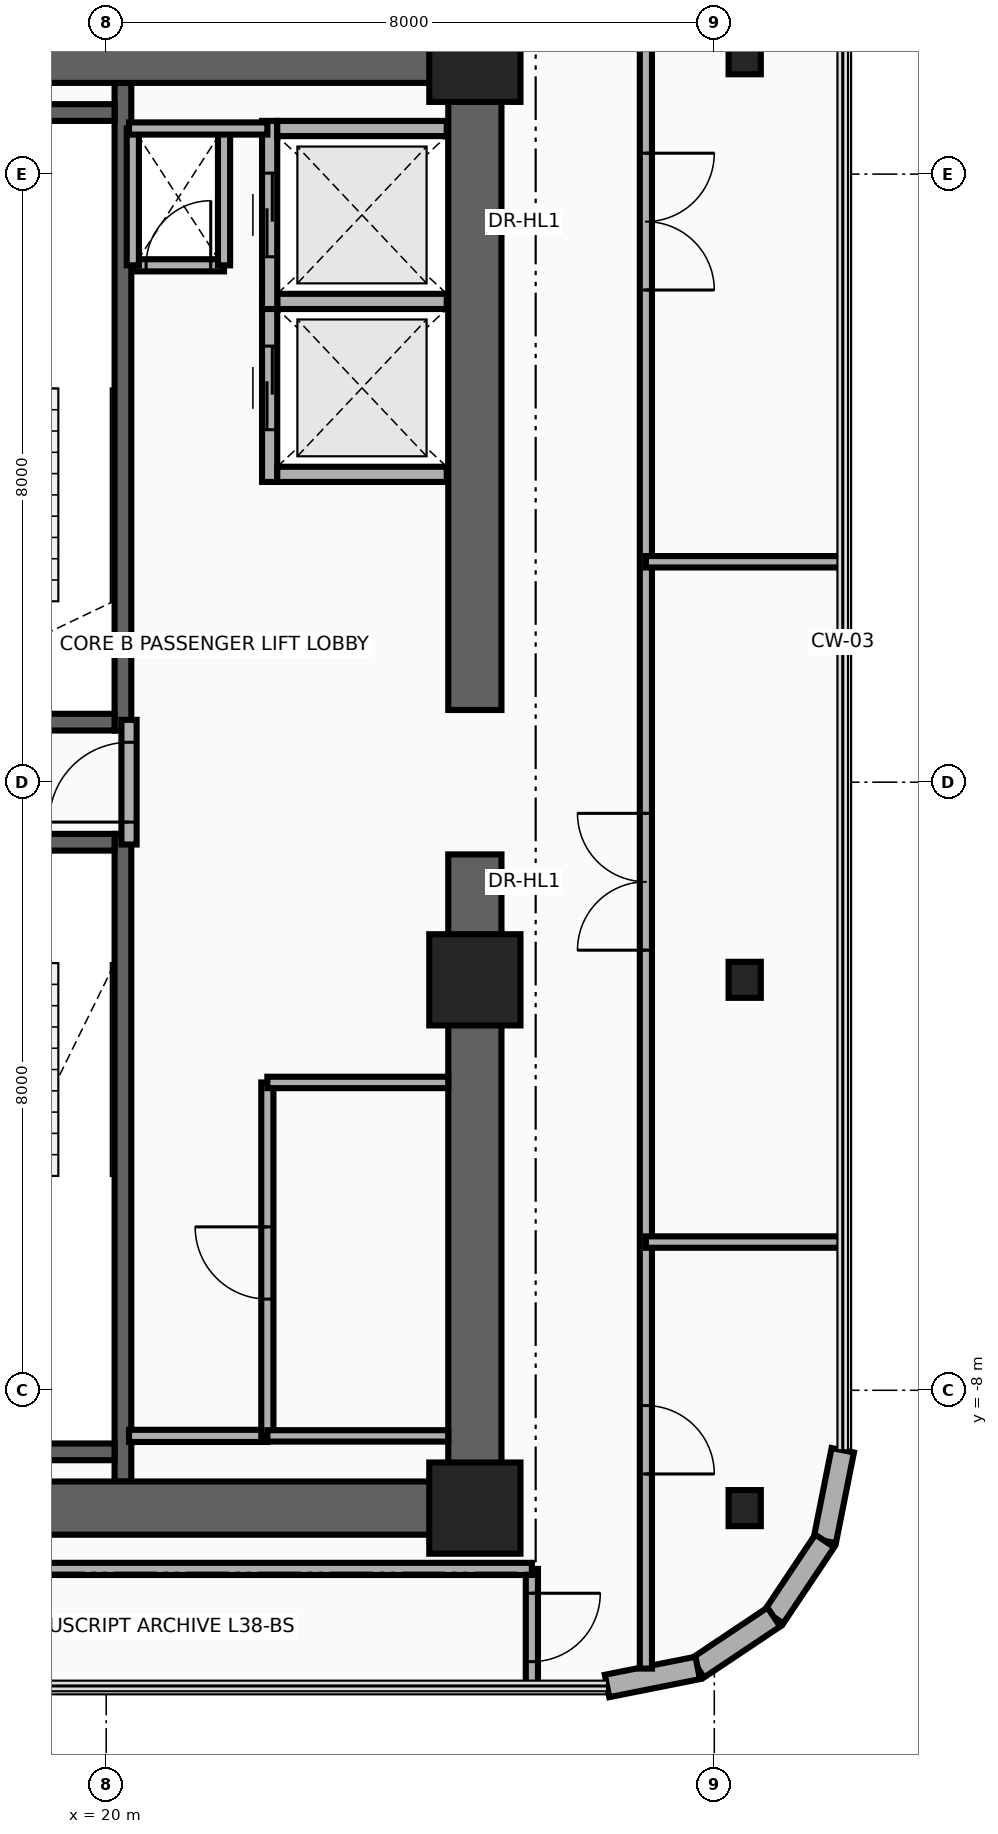
"""IFC4 building model, lengths in metres.
Left out: names, types, materials, properties, quantities, classifications, styles, units other than length and angle.
Written with IfcOpenShell. Run it as: python <this file> out.ifc"""

import sys

from ifc_helpers import new_model, si_unit, direction, frame, frame_2d, origin, origin_2d, place, context, subcontext, project, spatial, rectangle, i_section, extrude, source, transform, mapped, element, fill, save


model = new_model("IFC4")
c1 = context("Model", 3, precision=1e-05, world=origin(), true_north=direction((0.0, 1.0)))
c2 = subcontext(c1, "Body", "Model", "MODEL_VIEW")
j1 = project(units=[si_unit("LENGTHUNIT", "METRE"), si_unit("PLANEANGLEUNIT", "RADIAN")], contexts=[c1])
p1 = place(None, origin())
s1 = spatial("IfcSite", under=j1, at=p1, CompositionType="ELEMENT")
p2 = place(p1, origin())
s2 = spatial("IfcBuilding", under=s1, at=p2, CompositionType="ELEMENT")
p3 = place(p2, frame((0.0, 0.0, 150.1)))
s3 = spatial("IfcBuildingStorey", under=s2, at=p3, CompositionType="ELEMENT", Elevation=150.1)
p4 = place(p3, frame((20.22, 0.68, 0.0), z_axis=(0.0, 0.0, 1.0), x_axis=(0.0, 1.0, 0.0)))
e1 = element("IfcWall", 1, at=p4, inside=s3, PredefinedType="SHEAR", context=c2, shape_type="SweptSolid", body=[
    extrude(rectangle(XDim=8.52, YDim=0.22, at=frame_2d((4.26, 0.0))), origin(), (0.0, 0.0, 1.0), 3.46),
])
p5 = place(p3, frame((17.0, 0.79, 0.0), z_axis=(0.0, 0.0, 1.0), x_axis=(1.0, 0.0, 0.0)))
e2 = element("IfcWall", 2, at=p5, inside=s3, PredefinedType="SHEAR", context=c2, shape_type="SweptSolid", body=[
    extrude(rectangle(XDim=3.11, YDim=0.22, at=frame_2d((1.555, 0.0))), origin(), (0.0, 0.0, 1.0), 3.46),
])
p6 = place(p5, frame((0.95, 0.0, 0.0)))
e3 = element("IfcOpeningElement", 3, at=p6, cuts=e2, PredefinedType="OPENING", context=c2, shape_type="SweptSolid", body=[
    extrude(rectangle(XDim=1.1, YDim=2.15, at=frame_2d((0.55, 1.075))), frame((0.0, 0.125, 0.0), z_axis=(0.0, -1.0, 0.0), x_axis=(1.0, 0.0, 0.0)), (0.0, 0.0, 1.0), 0.25),
])
p7 = place(p3, frame((17.0, 8.81, 0.0), z_axis=(0.0, 0.0, 1.0), x_axis=(1.0, 0.0, 0.0)))
e4 = element("IfcWall", 4, at=p7, inside=s3, PredefinedType="SHEAR", context=c2, shape_type="SweptSolid", body=[
    extrude(rectangle(XDim=3.11, YDim=0.22, at=frame_2d((1.555, 0.0))), origin(), (0.0, 0.0, 1.0), 3.46),
])
p8 = place(p3, frame((20.22, -9.2, 0.0), z_axis=(0.0, 0.0, 1.0), x_axis=(0.0, 1.0, 0.0)))
e5 = element("IfcWall", 5, at=p8, inside=s3, PredefinedType="SHEAR", context=c2, shape_type="SweptSolid", body=[
    extrude(rectangle(XDim=8.52, YDim=0.22, at=frame_2d((4.26, 0.0))), origin(), (0.0, 0.0, 1.0), 3.46),
])
p9 = place(p3, frame((17.0, -8.81, 0.0), z_axis=(0.0, 0.0, 1.0), x_axis=(1.0, 0.0, 0.0)))
e6 = element("IfcWall", 6, at=p9, inside=s3, PredefinedType="SHEAR", context=c2, shape_type="SweptSolid", body=[
    extrude(rectangle(XDim=3.11, YDim=0.22, at=frame_2d((1.555, 0.0))), origin(), (0.0, 0.0, 1.0), 3.46),
])
p10 = place(p3, frame((17.0, -0.79, 0.0), z_axis=(0.0, 0.0, 1.0), x_axis=(1.0, 0.0, 0.0)))
e7 = element("IfcWall", 7, at=p10, inside=s3, PredefinedType="SHEAR", context=c2, shape_type="SweptSolid", body=[
    extrude(rectangle(XDim=3.11, YDim=0.22, at=frame_2d((1.555, 0.0))), origin(), (0.0, 0.0, 1.0), 3.46),
])
p11 = place(p10, frame((0.95, 0.0, 0.0)))
e8 = element("IfcOpeningElement", 8, at=p11, cuts=e7, PredefinedType="OPENING", context=c2, shape_type="SweptSolid", body=[
    extrude(rectangle(XDim=1.1, YDim=2.15, at=frame_2d((0.55, 1.075))), frame((0.0, 0.125, 0.0), z_axis=(0.0, -1.0, 0.0), x_axis=(1.0, 0.0, 0.0)), (0.0, 0.0, 1.0), 0.25),
])
for number, where, z_axis, x_axis in (
    (9, (24.85, -9.9, 0.0), (0.0, 0.0, 1.0), (0.0, 1.0, 0.0)),
    (10, (24.85, 0.95, 0.0), (0.0, 0.0, 1.0), (0.0, 1.0, 0.0)),
):
    element("IfcWall", number, at=place(p3, frame(where, z_axis=z_axis, x_axis=x_axis)), inside=s3, PredefinedType="SHEAR", context=c2, shape_type="SweptSolid", body=[
        extrude(rectangle(XDim=8.95, YDim=0.7, at=frame_2d((4.475, 0.0))), origin(), (0.0, 0.0, 1.0), 3.46),
    ])
for number, where, z_axis, x_axis in (
    (11, (15.85, 9.55, 0.0), (0.0, 0.0, 1.0), (1.0, 0.0, 0.0)),
    (12, (15.85, -9.55, 0.0), (0.0, 0.0, 1.0), (1.0, 0.0, 0.0)),
):
    element("IfcWall", number, at=place(p3, frame(where, z_axis=z_axis, x_axis=x_axis)), inside=s3, PredefinedType="SHEAR", context=c2, shape_type="SweptSolid", body=[
        extrude(rectangle(XDim=9.0, YDim=0.7, at=frame_2d((4.5, 0.0))), origin(), (0.0, 0.0, 1.0), 3.46),
    ])
m1 = source(origin(), c2, "Body", "SweptSolid", [
    extrude(rectangle(XDim=1.2, YDim=1.2, at=origin_2d()), origin(), (0.0, 0.0, 1.0), 3.7),
])
p12 = place(p3, frame((24.85, -9.55, 0.0), z_axis=(0.0, 0.0, 1.0), x_axis=(1.0, 0.0, 0.0)))
e13 = element("IfcColumn", 13, at=p12, inside=s3, PredefinedType="COLUMN", context=c2, shape_type="MappedRepresentation", body=[
    mapped(m1, transform((0.0, 0.0, 0.0), x_axis=(1.0, 0.0, 0.0), y_axis=(0.0, 1.0, 0.0), z_axis=(0.0, 0.0, 1.0), scale=1.0)),
])
m2 = source(origin(), c2, "Body", "SweptSolid", [
    extrude(i_section(OverallWidth=0.424, OverallDepth=0.474, WebThickness=0.048, FlangeThickness=0.077, at=origin_2d()), origin(), (0.0, 0.0, 1.0), 3.7),
])
p13 = place(p3, frame((28.4, -9.55, 0.0), z_axis=(0.0, 0.0, 1.0), x_axis=(1.0, 0.0, 0.0)))
e14 = element("IfcColumn", 14, at=p13, inside=s3, PredefinedType="COLUMN", context=c2, shape_type="MappedRepresentation", body=[
    mapped(m2, transform((0.0, 0.0, 0.0), x_axis=(1.0, 0.0, 0.0), y_axis=(0.0, 1.0, 0.0), z_axis=(0.0, 0.0, 1.0), scale=1.0)),
])
p14 = place(p3, frame((24.85, -2.6, 0.0), z_axis=(0.0, 0.0, 1.0), x_axis=(1.0, 0.0, 0.0)))
e15 = element("IfcColumn", 15, at=p14, inside=s3, PredefinedType="COLUMN", context=c2, shape_type="MappedRepresentation", body=[
    mapped(m1, transform((0.0, 0.0, 0.0), x_axis=(1.0, 0.0, 0.0), y_axis=(0.0, 1.0, 0.0), z_axis=(0.0, 0.0, 1.0), scale=1.0)),
])
p15 = place(p3, frame((28.4, -2.6, 0.0), z_axis=(0.0, 0.0, 1.0), x_axis=(1.0, 0.0, 0.0)))
e16 = element("IfcColumn", 16, at=p15, inside=s3, PredefinedType="COLUMN", context=c2, shape_type="MappedRepresentation", body=[
    mapped(m2, transform((0.0, 0.0, 0.0), x_axis=(1.0, 0.0, 0.0), y_axis=(0.0, 1.0, 0.0), z_axis=(0.0, 0.0, 1.0), scale=1.0)),
])
p16 = place(p3, frame((24.85, 9.55, 0.0), z_axis=(0.0, 0.0, 1.0), x_axis=(1.0, 0.0, 0.0)))
e17 = element("IfcColumn", 17, at=p16, inside=s3, PredefinedType="COLUMN", context=c2, shape_type="MappedRepresentation", body=[
    mapped(m1, transform((0.0, 0.0, 0.0), x_axis=(1.0, 0.0, 0.0), y_axis=(0.0, 1.0, 0.0), z_axis=(0.0, 0.0, 1.0), scale=1.0)),
])
p17 = place(p3, frame((28.4, 9.55, 0.0), z_axis=(0.0, 0.0, 1.0), x_axis=(1.0, 0.0, 0.0)))
e18 = element("IfcColumn", 18, at=p17, inside=s3, PredefinedType="COLUMN", context=c2, shape_type="MappedRepresentation", body=[
    mapped(m2, transform((0.0, 0.0, 0.0), x_axis=(1.0, 0.0, 0.0), y_axis=(0.0, 1.0, 0.0), z_axis=(0.0, 0.0, 1.0), scale=1.0)),
])
p18 = place(p3, frame((29.69, -8.789, 0.0), z_axis=(0.0, 0.0, 1.0), x_axis=(-0.194996050505, -0.980804027463, 0.0)))
e19 = element("IfcWall", 19, at=p18, inside=s3, PredefinedType="SOLIDWALL", context=c2, shape_type="SweptSolid", body=[
    extrude(rectangle(XDim=1.216, YDim=0.3, at=frame_2d((0.608, 0.0))), origin(), (0.0, 0.0, 1.0), 3.46),
])
for number, where, z_axis, x_axis in (
    (20, (29.453, -9.982, 0.0), (0.0, 0.0, 1.0), (-0.556, -0.831, 0.0)),
    (21, (28.783, -10.983, 0.0), (0.0, 0.0, 1.0), (-0.831, -0.556, 0.0)),
):
    element("IfcWall", number, at=place(p3, frame(where, z_axis=z_axis, x_axis=x_axis)), inside=s3, PredefinedType="SOLIDWALL", context=c2, shape_type="SweptSolid", body=[
        extrude(rectangle(XDim=1.205, YDim=0.3, at=frame_2d((0.603, 0.0))), origin(), (0.0, 0.0, 1.0), 3.46),
    ])
p19 = place(p3, frame((27.782, -11.653, 0.0), z_axis=(0.0, 0.0, 1.0), x_axis=(-0.980811661072, -0.194957650543, 0.0)))
e22 = element("IfcWall", 22, at=p19, inside=s3, PredefinedType="SOLIDWALL", context=c2, shape_type="SweptSolid", body=[
    extrude(rectangle(XDim=1.216, YDim=0.3, at=frame_2d((0.608, 0.0))), origin(), (0.0, 0.0, 1.0), 3.46),
])
p20 = place(p3, frame((22.15, 3.95, 0.0), z_axis=(0.0, 0.0, 1.0), x_axis=(0.0, 1.0, 0.0)))
e23 = element("IfcWall", 23, at=p20, inside=s3, PredefinedType="MOVABLE", context=c2, shape_type="SweptSolid", body=[
    extrude(rectangle(XDim=2.475, YDim=0.2, at=frame_2d((1.238, 0.0))), origin(), (0.0, 0.0, 1.0), 3.46),
])
p21 = place(p20, frame((0.688, 0.0, 0.0)))
e24 = element("IfcOpeningElement", 24, at=p21, cuts=e23, PredefinedType="OPENING", context=c2, shape_type="SweptSolid", body=[
    extrude(rectangle(XDim=1.1, YDim=2.1, at=frame_2d((0.55, 1.05))), frame((0.0, 0.115, 0.0), z_axis=(0.0, -1.0, 0.0), x_axis=(1.0, 0.0, 0.0)), (0.0, 0.0, 1.0), 0.23),
])
for number, where, z_axis, x_axis in (
    (25, (22.25, 4.05, 0.0), (0.0, 0.0, 1.0), (1.0, 0.0, 0.0)),
    (26, (22.25, 6.325, 0.0), (0.0, 0.0, 1.0), (1.0, 0.0, 0.0)),
):
    element("IfcWall", number, at=place(p3, frame(where, z_axis=z_axis, x_axis=x_axis)), inside=s3, PredefinedType="MOVABLE", context=c2, shape_type="SweptSolid", body=[
        extrude(rectangle(XDim=2.23, YDim=0.2, at=frame_2d((1.115, 0.0))), origin(), (0.0, 0.0, 1.0), 2.245),
    ])
p22 = place(p3, frame((22.15, 6.225, 0.0), z_axis=(0.0, 0.0, 1.0), x_axis=(0.0, 1.0, 0.0)))
e27 = element("IfcWall", 27, at=p22, inside=s3, PredefinedType="MOVABLE", context=c2, shape_type="SweptSolid", body=[
    extrude(rectangle(XDim=2.475, YDim=0.2, at=frame_2d((1.237, 0.0))), origin(), (0.0, 0.0, 1.0), 3.46),
])
p23 = place(p22, frame((0.688, 0.0, 0.0)))
e28 = element("IfcOpeningElement", 28, at=p23, cuts=e27, PredefinedType="OPENING", context=c2, shape_type="SweptSolid", body=[
    extrude(rectangle(XDim=1.1, YDim=2.1, at=frame_2d((0.55, 1.05))), frame((0.0, 0.115, 0.0), z_axis=(0.0, -1.0, 0.0), x_axis=(1.0, 0.0, 0.0)), (0.0, 0.0, 1.0), 0.23),
])
p24 = place(p3, frame((22.25, 8.6, 0.0), z_axis=(0.0, 0.0, 1.0), x_axis=(1.0, 0.0, 0.0)))
e29 = element("IfcWall", 29, at=p24, inside=s3, PredefinedType="MOVABLE", context=c2, shape_type="SweptSolid", body=[
    extrude(rectangle(XDim=2.23, YDim=0.2, at=frame_2d((1.115, 0.0))), origin(), (0.0, 0.0, 1.0), 2.245),
])
p25 = place(p3, frame((20.3, -0.82, 0.0), z_axis=(0.0, 0.0, 1.0), x_axis=(0.0, 1.0, 0.0)))
e30 = element("IfcWall", 30, at=p25, inside=s3, PredefinedType="PARTITIONING", context=c2, shape_type="SweptSolid", body=[
    extrude(rectangle(XDim=1.64, YDim=0.2, at=frame_2d((0.82, 0.0))), origin(), (0.0, 0.0, 1.0), 3.46),
])
p26 = place(p25, frame((0.295, 0.0, 0.0)))
e31 = element("IfcOpeningElement", 31, at=p26, cuts=e30, PredefinedType="OPENING", context=c2, shape_type="SweptSolid", body=[
    extrude(rectangle(XDim=1.05, YDim=2.15, at=frame_2d((0.525, 1.075))), frame((0.0, 0.115, 0.0), z_axis=(0.0, -1.0, 0.0), x_axis=(1.0, 0.0, 0.0)), (0.0, 0.0, 1.0), 0.23),
])
p27 = place(p3, frame((20.35, 6.8, 0.0), z_axis=(0.0, 0.0, 1.0), x_axis=(1.0, 0.0, 0.0)))
e32 = element("IfcWall", 32, at=p27, inside=s3, PredefinedType="PARTITIONING", context=c2, shape_type="SweptSolid", body=[
    extrude(rectangle(XDim=1.2, YDim=0.16, at=frame_2d((0.6, 0.0))), origin(), (0.0, 0.0, 1.0), 3.46),
])
p28 = place(p27, frame((0.175, 0.0, 0.0)))
e33 = element("IfcOpeningElement", 33, at=p28, cuts=e32, PredefinedType="OPENING", context=c2, shape_type="SweptSolid", body=[
    extrude(rectangle(XDim=0.85, YDim=2.05, at=frame_2d((0.425, 1.025))), frame((0.0, 0.095, 0.0), z_axis=(0.0, -1.0, 0.0), x_axis=(1.0, 0.0, 0.0)), (0.0, 0.0, 1.0), 0.19),
])
for number, where, z_axis, x_axis in (
    (34, (21.55, 6.8, 0.0), (0.0, 0.0, 1.0), (0.0, 1.0, 0.0)),
    (35, (20.35, 6.8, 0.0), (0.0, 0.0, 1.0), (0.0, 1.0, 0.0)),
):
    element("IfcWall", number, at=place(p3, frame(where, z_axis=z_axis, x_axis=x_axis)), inside=s3, PredefinedType="PARTITIONING", context=c2, shape_type="SweptSolid", body=[
        extrude(rectangle(XDim=1.8, YDim=0.16, at=frame_2d((0.9, 0.0))), origin(), (0.0, 0.0, 1.0), 3.46),
    ])
for number, where, z_axis, x_axis in (
    (36, (20.3, -8.6, 0.0), (0.0, 0.0, 1.0), (1.0, 0.0, 0.0)),
    (37, (20.3, 8.6, 0.0), (0.0, 0.0, 1.0), (1.0, 0.0, 0.0)),
):
    element("IfcWall", number, at=place(p3, frame(where, z_axis=z_axis, x_axis=x_axis)), inside=s3, PredefinedType="PARTITIONING", context=c2, shape_type="SweptSolid", body=[
        extrude(rectangle(XDim=1.82, YDim=0.16, at=frame_2d((0.91, 0.0))), origin(), (0.0, 0.0, 1.0), 3.46),
    ])
p29 = place(p3, frame((22.12, -8.6, 0.0), z_axis=(0.0, 0.0, 1.0), x_axis=(0.0, 1.0, 0.0)))
e38 = element("IfcWall", 38, at=p29, inside=s3, PredefinedType="PARTITIONING", context=c2, shape_type="SweptSolid", body=[
    extrude(rectangle(XDim=4.65, YDim=0.16, at=frame_2d((2.325, 0.0))), origin(), (0.0, 0.0, 1.0), 3.46),
])
p30 = place(p29, frame((1.8, 0.0, 0.0)))
e39 = element("IfcOpeningElement", 39, at=p30, cuts=e38, PredefinedType="OPENING", context=c2, shape_type="SweptSolid", body=[
    extrude(rectangle(XDim=0.95, YDim=2.15, at=frame_2d((0.475, 1.075))), frame((0.0, 0.095, 0.0), z_axis=(0.0, -1.0, 0.0), x_axis=(1.0, 0.0, 0.0)), (0.0, 0.0, 1.0), 0.19),
])
for number, where, z_axis, x_axis in (
    (40, (22.12, -3.95, 0.0), (0.0, 0.0, 1.0), (1.0, 0.0, 0.0)),
    (41, (22.12, -8.6, 0.0), (0.0, 0.0, 1.0), (1.0, 0.0, 0.0)),
):
    element("IfcWall", number, at=place(p3, frame(where, z_axis=z_axis, x_axis=x_axis)), inside=s3, PredefinedType="PARTITIONING", context=c2, shape_type="SweptSolid", body=[
        extrude(rectangle(XDim=2.38, YDim=0.15, at=frame_2d((1.19, 0.0))), origin(), (0.0, 0.0, 1.0), 3.46),
    ])
p31 = place(p3, frame((25.6, -11.89, 0.0), z_axis=(0.0, 0.0, 1.0), x_axis=(0.0, 1.0, 0.0)))
e42 = element("IfcWall", 42, at=p31, inside=s3, PredefinedType="PARTITIONING", context=c2, shape_type="SweptSolid", body=[
    extrude(rectangle(XDim=1.54, YDim=0.16, at=frame_2d((0.77, 0.0))), origin(), (0.0, 0.0, 1.0), 3.46),
])
p32 = place(p31, frame((0.32, 0.0, 0.0)))
e43 = element("IfcOpeningElement", 43, at=p32, cuts=e42, PredefinedType="OPENING", context=c2, shape_type="SweptSolid", body=[
    extrude(rectangle(XDim=0.9, YDim=2.1, at=frame_2d((0.45, 1.05))), frame((0.0, 0.095, 0.0), z_axis=(0.0, -1.0, 0.0), x_axis=(1.0, 0.0, 0.0)), (0.0, 0.0, 1.0), 0.19),
])
p33 = place(p3, frame((14.044, -10.35, 0.0), z_axis=(0.0, 0.0, 1.0), x_axis=(1.0, 0.0, 0.0)))
e44 = element("IfcWall", 44, at=p33, inside=s3, PredefinedType="PARTITIONING", context=c2, shape_type="SweptSolid", body=[
    extrude(rectangle(XDim=11.556, YDim=0.16, at=frame_2d((5.778, 0.0))), origin(), (0.0, 0.0, 1.0), 3.46),
])
p34 = place(p3, frame((27.1, -11.661, 0.0), z_axis=(0.0, 0.0, 1.0), x_axis=(0.0, 1.0, 0.0)))
e45 = element("IfcWall", 45, at=p34, inside=s3, PredefinedType="PARTITIONING", context=c2, shape_type="SweptSolid", body=[
    extrude(rectangle(XDim=23.511, YDim=0.16, at=frame_2d((11.755, 0.0))), origin(), (0.0, 0.0, 1.0), 2.666),
])
p35 = place(p34, frame((2.56, 0.0, 0.0)))
e46 = element("IfcOpeningElement", 46, at=p35, cuts=e45, PredefinedType="OPENING", context=c2, shape_type="SweptSolid", body=[
    extrude(rectangle(XDim=0.9, YDim=2.1, at=frame_2d((0.45, 1.05))), frame((0.0, 0.095, 0.0), z_axis=(0.0, -1.0, 0.0), x_axis=(1.0, 0.0, 0.0)), (0.0, 0.0, 1.0), 0.19),
])
p36 = place(p34, frame((9.451, 0.0, 0.0)))
e47 = element("IfcOpeningElement", 47, at=p36, cuts=e45, PredefinedType="OPENING", context=c2, shape_type="SweptSolid", body=[
    extrude(rectangle(XDim=1.8, YDim=2.15, at=frame_2d((0.9, 1.075))), frame((0.0, 0.095, 0.0), z_axis=(0.0, -1.0, 0.0), x_axis=(1.0, 0.0, 0.0)), (0.0, 0.0, 1.0), 0.19),
])
p37 = place(p34, frame((18.136, 0.0, 0.0)))
e48 = element("IfcOpeningElement", 48, at=p37, cuts=e45, PredefinedType="OPENING", context=c2, shape_type="SweptSolid", body=[
    extrude(rectangle(XDim=1.8, YDim=2.15, at=frame_2d((0.9, 1.075))), frame((0.0, 0.095, 0.0), z_axis=(0.0, -1.0, 0.0), x_axis=(1.0, 0.0, 0.0)), (0.0, 0.0, 1.0), 0.19),
])
for number, where, z_axis, x_axis in (
    (49, (27.1, -6.05, 0.0), (0.0, 0.0, 1.0), (1.0, 0.0, 0.0)),
    (50, (27.1, 2.9, 0.0), (0.0, 0.0, 1.0), (1.0, 0.0, 0.0)),
):
    element("IfcWall", number, at=place(p3, frame(where, z_axis=z_axis, x_axis=x_axis)), inside=s3, PredefinedType="PARTITIONING", context=c2, shape_type="SweptSolid", body=[
        extrude(rectangle(XDim=2.59, YDim=0.15, at=frame_2d((1.295, 0.0))), origin(), (0.0, 0.0, 1.0), 2.896),
    ])
p38 = place(p21, origin())
e51 = element("IfcDoor", 51, at=p38, inside=s3, OperationType="DOUBLE_DOOR_SLIDING", PredefinedType="DOOR", context=c2, shape_type="SweptSolid", body=[
    extrude(rectangle(XDim=1.1, YDim=2.1, at=frame_2d((0.55, 1.05))), frame((0.0, 0.025, 0.0), z_axis=(0.0, -1.0, 0.0), x_axis=(1.0, 0.0, 0.0)), (0.0, 0.0, 1.0), 0.05),
])
fill(e24, e51)
p39 = place(p23, origin())
e52 = element("IfcDoor", 52, at=p39, inside=s3, OperationType="DOUBLE_DOOR_SLIDING", PredefinedType="DOOR", context=c2, shape_type="SweptSolid", body=[
    extrude(rectangle(XDim=1.1, YDim=2.1, at=frame_2d((0.55, 1.05))), frame((0.0, 0.025, 0.0), z_axis=(0.0, -1.0, 0.0), x_axis=(1.0, 0.0, 0.0)), (0.0, 0.0, 1.0), 0.05),
])
fill(e28, e52)
p40 = place(p26, origin())
e53 = element("IfcDoor", 53, at=p40, inside=s3, OperationType="SINGLE_SWING_RIGHT", PredefinedType="DOOR", context=c2, shape_type="SweptSolid", body=[
    extrude(rectangle(XDim=1.05, YDim=2.15, at=frame_2d((0.525, 1.075))), frame((0.0, 0.025, 0.0), z_axis=(0.0, -1.0, 0.0), x_axis=(1.0, 0.0, 0.0)), (0.0, 0.0, 1.0), 0.05),
])
fill(e31, e53)
p41 = place(p28, origin())
e54 = element("IfcDoor", 54, at=p41, inside=s3, OperationType="SINGLE_SWING_LEFT", PredefinedType="DOOR", context=c2, shape_type="SweptSolid", body=[
    extrude(rectangle(XDim=0.85, YDim=2.05, at=frame_2d((0.425, 1.025))), frame((0.0, 0.025, 0.0), z_axis=(0.0, -1.0, 0.0), x_axis=(1.0, 0.0, 0.0)), (0.0, 0.0, 1.0), 0.05),
])
fill(e33, e54)
p42 = place(p30, origin())
e55 = element("IfcDoor", 55, at=p42, inside=s3, OperationType="SINGLE_SWING_RIGHT", PredefinedType="DOOR", context=c2, shape_type="SweptSolid", body=[
    extrude(rectangle(XDim=0.95, YDim=2.15, at=frame_2d((0.475, 1.075))), frame((0.0, 0.025, 0.0), z_axis=(0.0, -1.0, 0.0), x_axis=(1.0, 0.0, 0.0)), (0.0, 0.0, 1.0), 0.05),
])
fill(e39, e55)
p43 = place(p32, frame((0.9, 0.0, 0.0), z_axis=(0.0, 0.0, 1.0), x_axis=(-1.0, 0.0, 0.0)))
e56 = element("IfcDoor", 56, at=p43, inside=s3, OperationType="SINGLE_SWING_LEFT", PredefinedType="DOOR", context=c2, shape_type="SweptSolid", body=[
    extrude(rectangle(XDim=0.9, YDim=2.1, at=frame_2d((0.45, 1.05))), frame((0.0, 0.025, 0.0), z_axis=(0.0, -1.0, 0.0), x_axis=(1.0, 0.0, 0.0)), (0.0, 0.0, 1.0), 0.05),
])
fill(e43, e56)
p44 = place(p35, frame((0.9, 0.0, 0.0), z_axis=(0.0, 0.0, 1.0), x_axis=(-1.0, 0.0, 0.0)))
e57 = element("IfcDoor", 57, at=p44, inside=s3, OperationType="SINGLE_SWING_LEFT", PredefinedType="DOOR", context=c2, shape_type="SweptSolid", body=[
    extrude(rectangle(XDim=0.9, YDim=2.1, at=frame_2d((0.45, 1.05))), frame((0.0, 0.025, 0.0), z_axis=(0.0, -1.0, 0.0), x_axis=(1.0, 0.0, 0.0)), (0.0, 0.0, 1.0), 0.05),
])
fill(e46, e57)
p45 = place(p36, origin())
e58 = element("IfcDoor", 58, at=p45, inside=s3, OperationType="DOUBLE_DOOR_SINGLE_SWING", PredefinedType="DOOR", context=c2, shape_type="SweptSolid", body=[
    extrude(rectangle(XDim=1.8, YDim=2.15, at=frame_2d((0.9, 1.075))), frame((0.0, 0.025, 0.0), z_axis=(0.0, -1.0, 0.0), x_axis=(1.0, 0.0, 0.0)), (0.0, 0.0, 1.0), 0.05),
])
fill(e47, e58)
p46 = place(p37, frame((1.8, 0.0, 0.0), z_axis=(0.0, 0.0, 1.0), x_axis=(-1.0, 0.0, 0.0)))
e59 = element("IfcDoor", 59, at=p46, inside=s3, OperationType="DOUBLE_DOOR_SINGLE_SWING", PredefinedType="DOOR", context=c2, shape_type="SweptSolid", body=[
    extrude(rectangle(XDim=1.8, YDim=2.15, at=frame_2d((0.9, 1.075))), frame((0.0, 0.025, 0.0), z_axis=(0.0, -1.0, 0.0), x_axis=(1.0, 0.0, 0.0)), (0.0, 0.0, 1.0), 0.05),
])
fill(e48, e59)
save(model, sys.argv[1])
